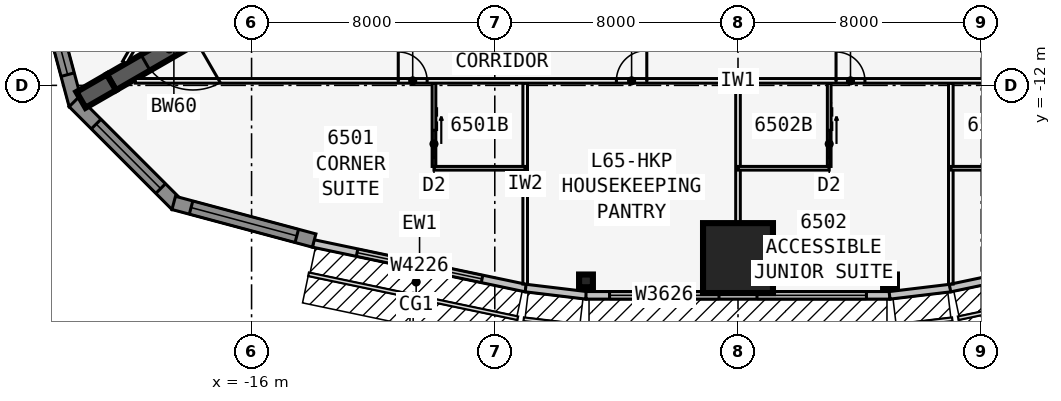
"""IFC4 building model, lengths in metres.
Left out: names, types, materials, properties, quantities, classifications, styles, units other than length and angle.
Written with IfcOpenShell. Run it as: python <this file> out.ifc"""

import sys

from ifc_helpers import new_model, si_unit, direction, frame, frame_2d, origin, origin_2d, place, context, subcontext, project, spatial, polyline, rectangle, i_section, outline, extrude, element, fill, save


model = new_model("IFC4")
c1 = context("Model", 3, precision=1e-05, world=origin(), true_north=direction((0.0, 1.0)))
c2 = subcontext(c1, "Body", "Model", "MODEL_VIEW")
j1 = project(units=[si_unit("LENGTHUNIT", "METRE"), si_unit("PLANEANGLEUNIT", "RADIAN")], contexts=[c1])
p1 = place(None, origin())
s1 = spatial("IfcSite", under=j1, at=p1, CompositionType="ELEMENT")
p2 = place(p1, origin())
s2 = spatial("IfcBuilding", under=s1, at=p2, CompositionType="ELEMENT")
p3 = place(p2, frame((0.0, 0.0, 246.5)))
s3 = spatial("IfcBuildingStorey", under=s2, at=p3, CompositionType="ELEMENT", Elevation=246.5)
p4 = place(p3, frame((-16.5, -9.526, 0.0), z_axis=(0.0, 0.0, 1.0), x_axis=(-0.866031398331, -0.499989616998, 0.0)))
e1 = element("IfcWall", 1, at=p4, inside=s3, PredefinedType="SHEAR", context=c2, shape_type="SweptSolid", body=[
    extrude(rectangle(XDim=4.746, YDim=0.6, at=frame_2d((2.373, 0.0))), origin(), (0.0, 0.0, 1.0), 3.6),
])
p5 = place(p4, frame((1.65, 0.0, 0.0)))
e2 = element("IfcOpeningElement", 2, at=p5, cuts=e1, PredefinedType="OPENING", context=c2, shape_type="SweptSolid", body=[
    extrude(rectangle(XDim=1.8, YDim=2.13, at=frame_2d((0.9, 1.065))), frame((0.0, 0.31, 0.0), z_axis=(0.0, -1.0, 0.0), x_axis=(1.0, 0.0, 0.0)), (0.0, 0.0, 1.0), 0.62),
])
p6 = place(p3, frame((-20.61, -11.899, 0.0), z_axis=(0.0, 0.0, 1.0), x_axis=(-0.866009537788, -0.500027479704, 0.0)))
e3 = element("IfcWall", 3, at=p6, inside=s3, PredefinedType="SHEAR", context=c2, shape_type="SweptSolid", body=[
    extrude(rectangle(XDim=1.155, YDim=0.6, at=frame_2d((0.577, 0.0))), origin(), (0.0, 0.0, 1.0), 3.6),
])
for number, where, z_axis, x_axis in (
    (4, (-5.0, -18.43, 0.0), (0.0, 0.0, 1.0), (0.0, -1.0, 0.0)),
    (5, (5.0, -18.43, 0.0), (0.0, 0.0, 1.0), (0.0, -1.0, 0.0)),
):
    element("IfcColumn", number, at=place(p3, frame(where, z_axis=z_axis, x_axis=x_axis)), inside=s3, PredefinedType="COLUMN", context=c2, shape_type="SweptSolid", body=[
        extrude(i_section(OverallWidth=0.419, OverallDepth=0.455, WebThickness=0.042, FlangeThickness=0.068, at=origin_2d()), origin(), (0.0, 0.0, 1.0), 3.6),
    ])
p7 = place(p3, frame((0.0, -17.68, 0.0), z_axis=(0.0, 0.0, 1.0), x_axis=(0.0, -1.0, 0.0)))
e6 = element("IfcColumn", 6, at=p7, inside=s3, PredefinedType="COLUMN", context=c2, shape_type="SweptSolid", body=[
    extrude(rectangle(XDim=2.3, YDim=2.3, at=origin_2d()), origin(), (0.0, 0.0, 1.0), 3.6),
])
p8 = place(p3, frame((-13.974, -17.198, 0.0), z_axis=(0.0, 0.0, 1.0), x_axis=(0.978654320409, -0.205513311355, 0.0)))
e7 = element("IfcWall", 7, at=p8, inside=s3, PredefinedType="STANDARD", context=c2, shape_type="SweptSolid", body=[
    extrude(rectangle(XDim=7.153, YDim=0.25, at=frame_2d((3.576, 0.0))), origin(), (0.0, 0.0, 1.0), 3.435),
])
p9 = place(p8, frame((1.476, 0.0, 0.45)))
e8 = element("IfcOpeningElement", 8, at=p9, cuts=e7, PredefinedType="OPENING", context=c2, shape_type="SweptSolid", body=[
    extrude(rectangle(XDim=4.2, YDim=2.6, at=frame_2d((2.1, 1.3))), frame((0.0, 0.135, 0.0), z_axis=(0.0, -1.0, 0.0), x_axis=(1.0, 0.0, 0.0)), (0.0, 0.0, 1.0), 0.27),
])
p10 = place(p3, frame((-6.985, -18.667, 0.0), z_axis=(0.0, 0.0, 1.0), x_axis=(0.992877411981, -0.119140441403, 0.0)))
e9 = element("IfcWall", 9, at=p10, inside=s3, PredefinedType="STANDARD", context=c2, shape_type="SweptSolid", body=[
    extrude(rectangle(XDim=2.014, YDim=0.25, at=frame_2d((1.007, 0.0))), origin(), (0.0, 0.0, 1.0), 3.435),
])
p11 = place(p3, frame((-5.0, -18.906, 0.0), z_axis=(0.0, 0.0, 1.0), x_axis=(1.0, 0.0, 0.0)))
e10 = element("IfcWall", 10, at=p11, inside=s3, PredefinedType="STANDARD", context=c2, shape_type="SweptSolid", body=[
    extrude(rectangle(XDim=10.0, YDim=0.25, at=frame_2d((5.0, 0.0))), origin(), (0.0, 0.0, 1.0), 3.435),
])
p12 = place(p11, frame((0.775, 0.0, 0.45)))
e11 = element("IfcOpeningElement", 11, at=p12, cuts=e10, PredefinedType="OPENING", context=c2, shape_type="SweptSolid", body=[
    extrude(rectangle(XDim=3.6, YDim=2.6, at=frame_2d((1.8, 1.3))), frame((0.0, 0.135, 0.0), z_axis=(0.0, -1.0, 0.0), x_axis=(1.0, 0.0, 0.0)), (0.0, 0.0, 1.0), 0.27),
])
p13 = place(p11, frame((5.625, 0.0, 0.45)))
e12 = element("IfcOpeningElement", 12, at=p13, cuts=e10, PredefinedType="OPENING", context=c2, shape_type="SweptSolid", body=[
    extrude(rectangle(XDim=3.6, YDim=2.6, at=frame_2d((1.8, 1.3))), frame((0.0, 0.135, 0.0), z_axis=(0.0, -1.0, 0.0), x_axis=(1.0, 0.0, 0.0)), (0.0, 0.0, 1.0), 0.27),
])
p14 = place(p3, frame((4.985, -18.906, 0.0), z_axis=(0.0, 0.0, 1.0), x_axis=(0.992877411981, 0.119140441403, 0.0)))
e13 = element("IfcWall", 13, at=p14, inside=s3, PredefinedType="STANDARD", context=c2, shape_type="SweptSolid", body=[
    extrude(rectangle(XDim=2.014, YDim=0.25, at=frame_2d((1.007, 0.0))), origin(), (0.0, 0.0, 1.0), 3.435),
])
p15 = place(p3, frame((6.974, -18.668, 0.0), z_axis=(0.0, 0.0, 1.0), x_axis=(0.978654320409, 0.205513311355, 0.0)))
e14 = element("IfcWall", 14, at=p15, inside=s3, PredefinedType="STANDARD", context=c2, shape_type="SweptSolid", body=[
    extrude(rectangle(XDim=7.153, YDim=0.25, at=frame_2d((3.576, 0.0))), origin(), (0.0, 0.0, 1.0), 3.435),
])
p16 = place(p15, frame((1.476, 0.0, 0.45)))
e15 = element("IfcOpeningElement", 15, at=p16, cuts=e14, PredefinedType="OPENING", context=c2, shape_type="SweptSolid", body=[
    extrude(rectangle(XDim=4.2, YDim=2.6, at=frame_2d((2.1, 1.3))), frame((0.0, 0.135, 0.0), z_axis=(0.0, -1.0, 0.0), x_axis=(1.0, 0.0, 0.0)), (0.0, 0.0, 1.0), 0.27),
])
p17 = place(p3, frame((-23.02, -8.025, 0.0), z_axis=(0.0, 0.0, 1.0), x_axis=(0.25880328844, -0.965930048136, 0.0)))
e16 = element("IfcWall", 16, at=p17, inside=s3, PredefinedType="SOLIDWALL", context=c2, shape_type="SweptSolid", body=[
    extrude(outline(polyline([(4.782, 0.225), (4.722, 0.225), (4.375, 0.132), (4.351, 0.225), (0.0, 0.225), (0.0, -0.225), (4.782, -0.225), (4.782, 0.225)])), origin(), (0.0, 0.0, 1.0), 3.435),
])
p18 = place(p17, frame((0.75, 0.0, 0.45)))
e17 = element("IfcOpeningElement", 17, at=p18, cuts=e16, PredefinedType="OPENING", context=c2, shape_type="SweptSolid", body=[
    extrude(rectangle(XDim=3.0, YDim=2.6, at=frame_2d((1.5, 1.3))), frame((0.0, 0.235, 0.0), z_axis=(0.0, -1.0, 0.0), x_axis=(1.0, 0.0, 0.0)), (0.0, 0.0, 1.0), 0.47),
])
p19 = place(p3, frame((-21.841, -12.542, 0.0), z_axis=(0.0, 0.0, 1.0), x_axis=(0.707081252484, -0.707132308968, 0.0)))
e18 = element("IfcWall", 18, at=p19, inside=s3, PredefinedType="SOLIDWALL", context=c2, shape_type="SweptSolid", body=[
    extrude(outline(polyline([(4.782, 0.225), (0.431, 0.225), (0.406, 0.132), (0.059, 0.225), (0.0, 0.225), (0.0, -0.225), (4.782, -0.225), (4.782, 0.225)])), origin(), (0.0, 0.0, 1.0), 3.435),
])
p20 = place(p19, frame((1.031, 0.0, 0.45)))
e19 = element("IfcOpeningElement", 19, at=p20, cuts=e18, PredefinedType="OPENING", context=c2, shape_type="SweptSolid", body=[
    extrude(rectangle(XDim=3.0, YDim=2.6, at=frame_2d((1.5, 1.3))), frame((0.0, 0.235, 0.0), z_axis=(0.0, -1.0, 0.0), x_axis=(1.0, 0.0, 0.0)), (0.0, 0.0, 1.0), 0.47),
])
p21 = place(p3, frame((-18.561, -15.865, 0.0), z_axis=(0.0, 0.0, 1.0), x_axis=(0.965913862671, -0.258863689806, 0.0)))
e20 = element("IfcWall", 20, at=p21, inside=s3, PredefinedType="SOLIDWALL", context=c2, shape_type="SweptSolid", body=[
    extrude(rectangle(XDim=4.782, YDim=0.45, at=frame_2d((2.391, 0.0))), origin(), (0.0, 0.0, 1.0), 3.435),
])
p22 = place(p21, frame((0.591, 0.0, 0.45)))
e21 = element("IfcOpeningElement", 21, at=p22, cuts=e20, PredefinedType="OPENING", context=c2, shape_type="SweptSolid", body=[
    extrude(rectangle(XDim=3.6, YDim=2.6, at=frame_2d((1.8, 1.3))), frame((0.0, 0.235, 0.0), z_axis=(0.0, -1.0, 0.0), x_axis=(1.0, 0.0, 0.0)), (0.0, 0.0, 1.0), 0.47),
])
p23 = place(p3, frame((-19.827, -11.851, 0.0), z_axis=(0.0, 0.0, 1.0), x_axis=(1.0, 0.0, 0.0)))
e22 = element("IfcWall", 22, at=p23, inside=s3, PredefinedType="PARTITIONING", context=c2, shape_type="SweptSolid", body=[
    extrude(rectangle(XDim=39.654, YDim=0.15, at=frame_2d((19.827, 0.0))), origin(), (0.0, 0.0, 1.0), 3.435),
])
p24 = place(p23, frame((8.652, 0.0, 0.0)))
e23 = element("IfcOpeningElement", 23, at=p24, cuts=e22, PredefinedType="OPENING", context=c2, shape_type="SweptSolid", body=[
    extrude(rectangle(XDim=0.95, YDim=2.13, at=frame_2d((0.475, 1.065))), frame((0.0, 0.085, 0.0), z_axis=(0.0, -1.0, 0.0), x_axis=(1.0, 0.0, 0.0)), (0.0, 0.0, 1.0), 0.17),
])
p25 = place(p23, frame((15.827, 0.0, 0.0)))
e24 = element("IfcOpeningElement", 24, at=p25, cuts=e22, PredefinedType="OPENING", context=c2, shape_type="SweptSolid", body=[
    extrude(rectangle(XDim=1.0, YDim=2.13, at=frame_2d((0.5, 1.065))), frame((0.0, 0.085, 0.0), z_axis=(0.0, -1.0, 0.0), x_axis=(1.0, 0.0, 0.0)), (0.0, 0.0, 1.0), 0.17),
])
p26 = place(p23, frame((23.052, 0.0, 0.0)))
e25 = element("IfcOpeningElement", 25, at=p26, cuts=e22, PredefinedType="OPENING", context=c2, shape_type="SweptSolid", body=[
    extrude(rectangle(XDim=0.95, YDim=2.13, at=frame_2d((0.475, 1.065))), frame((0.0, 0.085, 0.0), z_axis=(0.0, -1.0, 0.0), x_axis=(1.0, 0.0, 0.0)), (0.0, 0.0, 1.0), 0.17),
])
p27 = place(p23, frame((30.052, 0.0, 0.0)))
e26 = element("IfcOpeningElement", 26, at=p27, cuts=e22, PredefinedType="OPENING", context=c2, shape_type="SweptSolid", body=[
    extrude(rectangle(XDim=0.95, YDim=2.13, at=frame_2d((0.475, 1.065))), frame((0.0, 0.085, 0.0), z_axis=(0.0, -1.0, 0.0), x_axis=(1.0, 0.0, 0.0)), (0.0, 0.0, 1.0), 0.17),
])
p28 = place(p3, frame((-7.0, -11.926, 0.0), z_axis=(0.0, 0.0, 1.0), x_axis=(0.0, -1.0, 0.0)))
e27 = element("IfcWall", 27, at=p28, inside=s3, PredefinedType="PARTITIONING", context=c2, shape_type="SweptSolid", body=[
    extrude(rectangle(XDim=6.609, YDim=0.15, at=frame_2d((3.304, 0.0))), origin(), (0.0, 0.0, 1.0), 2.678),
])
p29 = place(p3, frame((0.0, -11.926, 0.0), z_axis=(0.0, 0.0, 1.0), x_axis=(0.0, -1.0, 0.0)))
e28 = element("IfcWall", 28, at=p29, inside=s3, PredefinedType="PARTITIONING", context=c2, shape_type="SweptSolid", body=[
    extrude(rectangle(XDim=6.854, YDim=0.15, at=frame_2d((3.427, 0.0))), origin(), (0.0, 0.0, 1.0), 2.678),
])
p30 = place(p3, frame((7.0, -11.926, 0.0), z_axis=(0.0, 0.0, 1.0), x_axis=(0.0, -1.0, 0.0)))
e29 = element("IfcWall", 29, at=p30, inside=s3, PredefinedType="PARTITIONING", context=c2, shape_type="SweptSolid", body=[
    extrude(rectangle(XDim=6.609, YDim=0.15, at=frame_2d((3.304, 0.0))), origin(), (0.0, 0.0, 1.0), 2.678),
])
p31 = place(p3, frame((-10.0, -14.726, 0.0), z_axis=(0.0, 0.0, 1.0), x_axis=(1.0, 0.0, 0.0)))
e30 = element("IfcWall", 30, at=p31, inside=s3, PredefinedType="PLUMBINGWALL", context=c2, shape_type="SweptSolid", body=[
    extrude(rectangle(XDim=3.0, YDim=0.12, at=frame_2d((1.5, 0.0))), origin(), (0.0, 0.0, 1.0), 3.435),
])
p32 = place(p3, frame((-10.0, -11.926, 0.0), z_axis=(0.0, 0.0, 1.0), x_axis=(0.0, -1.0, 0.0)))
e31 = element("IfcWall", 31, at=p32, inside=s3, PredefinedType="PLUMBINGWALL", context=c2, shape_type="SweptSolid", body=[
    extrude(rectangle(XDim=2.74, YDim=0.12, at=frame_2d((1.37, 0.0))), origin(), (0.0, 0.0, 1.0), 3.435),
])
p33 = place(p32, frame((1.55, 0.0, 0.0)))
e32 = element("IfcOpeningElement", 32, at=p33, cuts=e31, PredefinedType="OPENING", context=c2, shape_type="SweptSolid", body=[
    extrude(rectangle(XDim=0.9, YDim=2.13, at=frame_2d((0.45, 1.065))), frame((0.0, 0.07, 0.0), z_axis=(0.0, -1.0, 0.0), x_axis=(1.0, 0.0, 0.0)), (0.0, 0.0, 1.0), 0.14),
])
p34 = place(p3, frame((0.0, -14.726, 0.0), z_axis=(0.0, 0.0, 1.0), x_axis=(1.0, 0.0, 0.0)))
e33 = element("IfcWall", 33, at=p34, inside=s3, PredefinedType="PLUMBINGWALL", context=c2, shape_type="SweptSolid", body=[
    extrude(rectangle(XDim=3.0, YDim=0.12, at=frame_2d((1.5, 0.0))), origin(), (0.0, 0.0, 1.0), 3.435),
])
p35 = place(p3, frame((3.0, -11.926, 0.0), z_axis=(0.0, 0.0, 1.0), x_axis=(0.0, -1.0, 0.0)))
e34 = element("IfcWall", 34, at=p35, inside=s3, PredefinedType="PLUMBINGWALL", context=c2, shape_type="SweptSolid", body=[
    extrude(rectangle(XDim=2.74, YDim=0.12, at=frame_2d((1.37, 0.0))), origin(), (0.0, 0.0, 1.0), 3.435),
])
p36 = place(p35, frame((1.55, 0.0, 0.0)))
e35 = element("IfcOpeningElement", 35, at=p36, cuts=e34, PredefinedType="OPENING", context=c2, shape_type="SweptSolid", body=[
    extrude(rectangle(XDim=0.9, YDim=2.13, at=frame_2d((0.45, 1.065))), frame((0.0, 0.07, 0.0), z_axis=(0.0, -1.0, 0.0), x_axis=(1.0, 0.0, 0.0)), (0.0, 0.0, 1.0), 0.14),
])
p37 = place(p3, frame((7.0, -14.726, 0.0), z_axis=(0.0, 0.0, 1.0), x_axis=(1.0, 0.0, 0.0)))
e36 = element("IfcWall", 36, at=p37, inside=s3, PredefinedType="PLUMBINGWALL", context=c2, shape_type="SweptSolid", body=[
    extrude(rectangle(XDim=3.0, YDim=0.12, at=frame_2d((1.5, 0.0))), origin(), (0.0, 0.0, 1.0), 3.435),
])
p38 = place(p3, frame((-0.35, 23.096, 0.0), z_axis=(0.0, 0.0, 1.0), x_axis=(-0.499998875317, -0.866026053119, 0.0)))
e37 = element("IfcWall", 37, at=p38, inside=s3, PredefinedType="PARTITIONING", context=c2, shape_type="SweptSolid", body=[
    extrude(rectangle(XDim=39.654, YDim=0.15, at=frame_2d((19.827, 0.0))), origin(), (0.0, 0.0, 1.0), 3.435),
])
p39 = place(p38, frame((8.652, 0.0, 0.0)))
e38 = element("IfcOpeningElement", 38, at=p39, cuts=e37, PredefinedType="OPENING", context=c2, shape_type="SweptSolid", body=[
    extrude(rectangle(XDim=0.95, YDim=2.13, at=frame_2d((0.475, 1.065))), frame((0.0, 0.085, 0.0), z_axis=(0.0, -1.0, 0.0), x_axis=(1.0, 0.0, 0.0)), (0.0, 0.0, 1.0), 0.17),
])
p40 = place(p38, frame((16.052, 0.0, 0.0)))
e39 = element("IfcOpeningElement", 39, at=p40, cuts=e37, PredefinedType="OPENING", context=c2, shape_type="SweptSolid", body=[
    extrude(rectangle(XDim=0.95, YDim=2.13, at=frame_2d((0.475, 1.065))), frame((0.0, 0.085, 0.0), z_axis=(0.0, -1.0, 0.0), x_axis=(1.0, 0.0, 0.0)), (0.0, 0.0, 1.0), 0.17),
])
p41 = place(p38, frame((23.052, 0.0, 0.0)))
e40 = element("IfcOpeningElement", 40, at=p41, cuts=e37, PredefinedType="OPENING", context=c2, shape_type="SweptSolid", body=[
    extrude(rectangle(XDim=0.95, YDim=2.13, at=frame_2d((0.475, 1.065))), frame((0.0, 0.085, 0.0), z_axis=(0.0, -1.0, 0.0), x_axis=(1.0, 0.0, 0.0)), (0.0, 0.0, 1.0), 0.17),
])
p42 = place(p38, frame((30.052, 0.0, 0.0)))
e41 = element("IfcOpeningElement", 41, at=p42, cuts=e37, PredefinedType="OPENING", context=c2, shape_type="SweptSolid", body=[
    extrude(rectangle(XDim=0.95, YDim=2.13, at=frame_2d((0.475, 1.065))), frame((0.0, 0.085, 0.0), z_axis=(0.0, -1.0, 0.0), x_axis=(1.0, 0.0, 0.0)), (0.0, 0.0, 1.0), 0.17),
])
p43 = place(p9, origin())
e42 = element("IfcWindow", 42, at=p43, inside=s3, PartitioningType="SINGLE_PANEL", PredefinedType="WINDOW", context=c2, shape_type="SweptSolid", body=[
    extrude(rectangle(XDim=4.2, YDim=2.6, at=frame_2d((2.1, 1.3))), frame((0.0, 0.03, 0.0), z_axis=(0.0, -1.0, 0.0), x_axis=(1.0, 0.0, 0.0)), (0.0, 0.0, 1.0), 0.06),
])
fill(e8, e42)
p44 = place(p12, origin())
e43 = element("IfcWindow", 43, at=p44, inside=s3, PartitioningType="SINGLE_PANEL", PredefinedType="WINDOW", context=c2, shape_type="SweptSolid", body=[
    extrude(rectangle(XDim=3.6, YDim=2.6, at=frame_2d((1.8, 1.3))), frame((0.0, 0.03, 0.0), z_axis=(0.0, -1.0, 0.0), x_axis=(1.0, 0.0, 0.0)), (0.0, 0.0, 1.0), 0.06),
])
fill(e11, e43)
p45 = place(p13, origin())
e44 = element("IfcWindow", 44, at=p45, inside=s3, PartitioningType="SINGLE_PANEL", PredefinedType="WINDOW", context=c2, shape_type="SweptSolid", body=[
    extrude(rectangle(XDim=3.6, YDim=2.6, at=frame_2d((1.8, 1.3))), frame((0.0, 0.03, 0.0), z_axis=(0.0, -1.0, 0.0), x_axis=(1.0, 0.0, 0.0)), (0.0, 0.0, 1.0), 0.06),
])
fill(e12, e44)
p46 = place(p18, origin())
e45 = element("IfcWindow", 45, at=p46, inside=s3, PartitioningType="SINGLE_PANEL", PredefinedType="WINDOW", context=c2, shape_type="SweptSolid", body=[
    extrude(rectangle(XDim=3.0, YDim=2.6, at=frame_2d((1.5, 1.3))), frame((0.0, 0.03, 0.0), z_axis=(0.0, -1.0, 0.0), x_axis=(1.0, 0.0, 0.0)), (0.0, 0.0, 1.0), 0.06),
])
fill(e17, e45)
p47 = place(p20, origin())
e46 = element("IfcWindow", 46, at=p47, inside=s3, PartitioningType="SINGLE_PANEL", PredefinedType="WINDOW", context=c2, shape_type="SweptSolid", body=[
    extrude(rectangle(XDim=3.0, YDim=2.6, at=frame_2d((1.5, 1.3))), frame((0.0, 0.03, 0.0), z_axis=(0.0, -1.0, 0.0), x_axis=(1.0, 0.0, 0.0)), (0.0, 0.0, 1.0), 0.06),
])
fill(e19, e46)
p48 = place(p22, origin())
e47 = element("IfcWindow", 47, at=p48, inside=s3, PartitioningType="SINGLE_PANEL", PredefinedType="WINDOW", context=c2, shape_type="SweptSolid", body=[
    extrude(rectangle(XDim=3.6, YDim=2.6, at=frame_2d((1.8, 1.3))), frame((0.0, 0.03, 0.0), z_axis=(0.0, -1.0, 0.0), x_axis=(1.0, 0.0, 0.0)), (0.0, 0.0, 1.0), 0.06),
])
fill(e21, e47)
p49 = place(p33, origin())
e48 = element("IfcDoor", 48, at=p49, inside=s3, OperationType="SLIDING_TO_LEFT", PredefinedType="DOOR", context=c2, shape_type="SweptSolid", body=[
    extrude(rectangle(XDim=0.9, YDim=2.13, at=frame_2d((0.45, 1.065))), frame((0.0, 0.025, 0.0), z_axis=(0.0, -1.0, 0.0), x_axis=(1.0, 0.0, 0.0)), (0.0, 0.0, 1.0), 0.05),
])
fill(e32, e48)
p50 = place(p24, origin())
e49 = element("IfcDoor", 49, at=p50, inside=s3, OperationType="SINGLE_SWING_LEFT", PredefinedType="DOOR", context=c2, shape_type="SweptSolid", body=[
    extrude(rectangle(XDim=0.95, YDim=2.13, at=frame_2d((0.475, 1.065))), frame((0.0, 0.025, 0.0), z_axis=(0.0, -1.0, 0.0), x_axis=(1.0, 0.0, 0.0)), (0.0, 0.0, 1.0), 0.05),
])
fill(e23, e49)
p51 = place(p25, origin())
e50 = element("IfcDoor", 50, at=p51, inside=s3, OperationType="SINGLE_SWING_RIGHT", PredefinedType="DOOR", context=c2, shape_type="SweptSolid", body=[
    extrude(rectangle(XDim=1.0, YDim=2.13, at=frame_2d((0.5, 1.065))), frame((0.0, 0.025, 0.0), z_axis=(0.0, -1.0, 0.0), x_axis=(1.0, 0.0, 0.0)), (0.0, 0.0, 1.0), 0.05),
])
fill(e24, e50)
p52 = place(p36, origin())
e51 = element("IfcDoor", 51, at=p52, inside=s3, OperationType="SLIDING_TO_LEFT", PredefinedType="DOOR", context=c2, shape_type="SweptSolid", body=[
    extrude(rectangle(XDim=0.9, YDim=2.13, at=frame_2d((0.45, 1.065))), frame((0.0, 0.025, 0.0), z_axis=(0.0, -1.0, 0.0), x_axis=(1.0, 0.0, 0.0)), (0.0, 0.0, 1.0), 0.05),
])
fill(e35, e51)
p53 = place(p26, origin())
e52 = element("IfcDoor", 52, at=p53, inside=s3, OperationType="SINGLE_SWING_LEFT", PredefinedType="DOOR", context=c2, shape_type="SweptSolid", body=[
    extrude(rectangle(XDim=0.95, YDim=2.13, at=frame_2d((0.475, 1.065))), frame((0.0, 0.025, 0.0), z_axis=(0.0, -1.0, 0.0), x_axis=(1.0, 0.0, 0.0)), (0.0, 0.0, 1.0), 0.05),
])
fill(e25, e52)
p54 = place(p5, origin())
e53 = element("IfcDoor", 53, at=p54, inside=s3, OperationType="DOUBLE_DOOR_DOUBLE_SWING", PredefinedType="DOOR", context=c2, shape_type="SweptSolid", body=[
    extrude(rectangle(XDim=1.8, YDim=2.13, at=frame_2d((0.9, 1.065))), frame((0.0, 0.025, 0.0), z_axis=(0.0, -1.0, 0.0), x_axis=(1.0, 0.0, 0.0)), (0.0, 0.0, 1.0), 0.05),
])
fill(e2, e53)
save(model, sys.argv[1])
